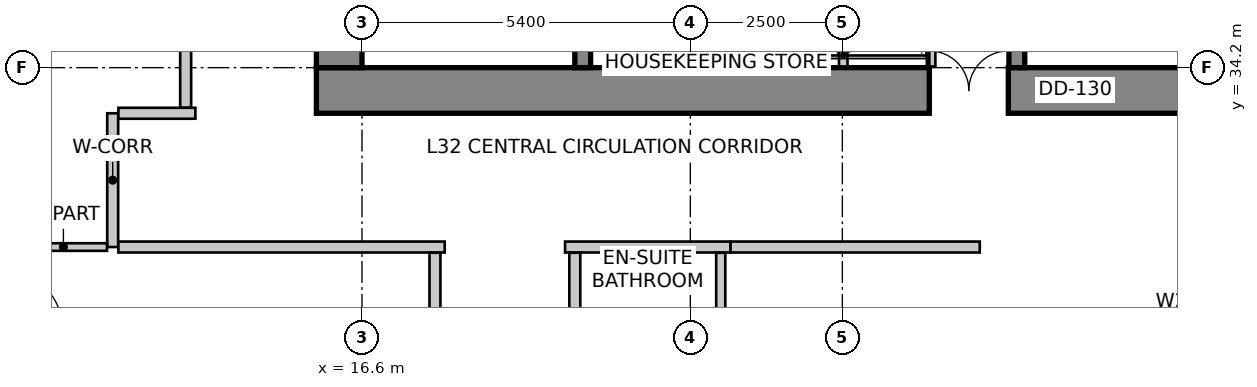
"""IFC4 building model, lengths in metres.
Left out: names, types, materials, properties, quantities, classifications, styles, units other than length and angle.
Written with IfcOpenShell. Run it as: python <this file> out.ifc"""

import sys

from ifc_helpers import new_model, si_unit, direction, frame, frame_2d, origin, place, context, subcontext, project, spatial, rectangle, extrude, source, transform, mapped, element, fill, save


model = new_model("IFC4")
c1 = context("Model", 3, precision=1e-05, world=origin(), true_north=direction((0.0, 1.0)))
c2 = subcontext(c1, "Body", "Model", "MODEL_VIEW")
j1 = project(units=[si_unit("LENGTHUNIT", "METRE"), si_unit("PLANEANGLEUNIT", "RADIAN")], contexts=[c1])
p1 = place(None, origin())
s1 = spatial("IfcSite", under=j1, at=p1, CompositionType="ELEMENT")
p2 = place(p1, origin())
s2 = spatial("IfcBuilding", under=s1, at=p2, CompositionType="ELEMENT")
p3 = place(p2, frame((0.0, 0.0, 132.2)))
s3 = spatial("IfcBuildingStorey", under=s2, at=p3, CompositionType="ELEMENT", Elevation=132.2)
p4 = place(p3, frame((15.85, 33.825, 0.0), z_axis=(0.0, 0.0, 1.0), x_axis=(1.0, 0.0, 0.0)))
e1 = element("IfcWall", 1, at=p4, inside=s3, PredefinedType="SHEAR", context=c2, shape_type="SweptSolid", body=[
    extrude(rectangle(XDim=15.9, YDim=0.75, at=frame_2d((7.95, 0.0))), origin(), (0.0, 0.0, 1.0), 3.6),
])
m1 = source(origin(), c2, "Body", "SweptSolid", [
    extrude(rectangle(XDim=1.3, YDim=2.15, at=frame_2d((0.65, 1.075))), frame((0.0, 0.385, 0.0), z_axis=(0.0, -1.0, 0.0), x_axis=(1.0, 0.0, 0.0)), (0.0, 0.0, 1.0), 0.77),
])
p5 = place(p4, frame((10.08, 0.0, 0.0)))
e2 = element("IfcOpeningElement", 2, at=p5, cuts=e1, PredefinedType="OPENING", context=c2, shape_type="MappedRepresentation", body=[
    mapped(m1, transform((0.0, 0.0, 0.0), scale=1.0)),
])
p6 = place(p3, frame((16.225, 34.2, 0.0), z_axis=(0.0, 0.0, 1.0), x_axis=(0.0, 1.0, 0.0)))
e3 = element("IfcWall", 3, at=p6, inside=s3, PredefinedType="SHEAR", context=c2, shape_type="SweptSolid", body=[
    extrude(rectangle(XDim=11.4, YDim=0.75, at=frame_2d((5.7, 0.0))), origin(), (0.0, 0.0, 1.0), 3.6),
])
m2 = source(origin(), c2, "Body", "SweptSolid", [
    extrude(rectangle(XDim=1.1, YDim=2.15, at=frame_2d((0.55, 1.075))), frame((0.0, 0.385, 0.0), z_axis=(0.0, -1.0, 0.0), x_axis=(1.0, 0.0, 0.0)), (0.0, 0.0, 1.0), 0.77),
])
p7 = place(p6, frame((7.15, 0.0, 0.0)))
e4 = element("IfcOpeningElement", 4, at=p7, cuts=e3, PredefinedType="OPENING", context=c2, shape_type="MappedRepresentation", body=[
    mapped(m2, transform((0.0, 0.0, 0.0), scale=1.0)),
])
p8 = place(p3, frame((20.23, 34.2, 0.0), z_axis=(0.0, 0.0, 1.0), x_axis=(0.0, 1.0, 0.0)))
e5 = element("IfcWall", 5, at=p8, inside=s3, PredefinedType="SHEAR", context=c2, shape_type="SweptSolid", body=[
    extrude(rectangle(XDim=9.06, YDim=0.26, at=frame_2d((4.53, 0.0))), origin(), (0.0, 0.0, 1.0), 3.6),
])
m3 = source(origin(), c2, "Body", "SweptSolid", [
    extrude(rectangle(XDim=1.1, YDim=2.15, at=frame_2d((0.55, 1.075))), frame((0.0, 0.14, 0.0), z_axis=(0.0, -1.0, 0.0), x_axis=(1.0, 0.0, 0.0)), (0.0, 0.0, 1.0), 0.28),
])
p9 = place(p8, frame((7.45, 0.0, 0.0)))
e6 = element("IfcOpeningElement", 6, at=p9, cuts=e5, PredefinedType="OPENING", context=c2, shape_type="MappedRepresentation", body=[
    mapped(m3, transform((0.0, 0.0, 0.0), scale=1.0)),
])
p10 = place(p3, frame((27.37, 34.2, 0.0), z_axis=(0.0, 0.0, 1.0), x_axis=(0.0, 1.0, 0.0)))
e7 = element("IfcWall", 7, at=p10, inside=s3, PredefinedType="SHEAR", context=c2, shape_type="SweptSolid", body=[
    extrude(rectangle(XDim=9.06, YDim=0.26, at=frame_2d((4.53, 0.0))), origin(), (0.0, 0.0, 1.0), 3.6),
])
p11 = place(p10, frame((7.45, 0.0, 0.0)))
e8 = element("IfcOpeningElement", 8, at=p11, cuts=e7, PredefinedType="OPENING", context=c2, shape_type="MappedRepresentation", body=[
    mapped(m3, transform((0.0, 0.0, 0.0), scale=1.0)),
])
p12 = place(p3, frame((28.884, 28.792, 0.0), z_axis=(0.0, 0.0, 1.0), x_axis=(0.707064797706, 0.707148762175, 0.0)))
e9 = element("IfcWall", 9, at=p12, inside=s3, PredefinedType="SOLIDWALL", context=c2, shape_type="SweptSolid", body=[
    extrude(rectangle(XDim=2.908, YDim=0.3, at=frame_2d((1.454, 0.0))), origin(), (0.0, 0.0, 1.0), 3.35),
])
m4 = source(origin(), c2, "Body", "SweptSolid", [
    extrude(rectangle(XDim=1.8, YDim=2.1, at=frame_2d((0.9, 1.05))), frame((0.0, 0.16, 0.0), z_axis=(0.0, -1.0, 0.0), x_axis=(1.0, 0.0, 0.0)), (0.0, 0.0, 1.0), 0.32),
])
p13 = place(p12, frame((0.554, 0.0, 0.85)))
e10 = element("IfcOpeningElement", 10, at=p13, cuts=e9, PredefinedType="OPENING", context=c2, shape_type="MappedRepresentation", body=[
    mapped(m4, transform((0.0, 0.0, 0.0), scale=1.0)),
])
p14 = place(p3, frame((13.269, 47.134, 0.0), z_axis=(0.0, 0.0, 1.0), x_axis=(-0.319929596295, -0.947441319246, 0.0)))
e11 = element("IfcWall", 11, at=p14, inside=s3, PredefinedType="SOLIDWALL", context=c2, shape_type="SweptSolid", body=[
    extrude(rectangle(XDim=16.134, YDim=0.3, at=frame_2d((8.067, 0.0))), origin(), (0.0, 0.0, 1.0), 3.35),
])
m5 = source(origin(), c2, "Body", "SweptSolid", [
    extrude(rectangle(XDim=2.4, YDim=2.2, at=frame_2d((1.2, 1.1))), frame((0.0, 0.16, 0.0), z_axis=(0.0, -1.0, 0.0), x_axis=(1.0, 0.0, 0.0)), (0.0, 0.0, 1.0), 0.32),
])
p15 = place(p14, frame((2.276, 0.0, 0.85)))
e12 = element("IfcOpeningElement", 12, at=p15, cuts=e11, PredefinedType="OPENING", context=c2, shape_type="MappedRepresentation", body=[
    mapped(m5, transform((0.0, 0.0, 0.0), scale=1.0)),
])
m6 = source(origin(), c2, "Body", "SweptSolid", [
    extrude(rectangle(XDim=2.1, YDim=2.0, at=frame_2d((1.05, 1.0))), frame((0.0, 0.16, 0.0), z_axis=(0.0, -1.0, 0.0), x_axis=(1.0, 0.0, 0.0)), (0.0, 0.0, 1.0), 0.32),
])
p16 = place(p14, frame((7.361, 0.0, 0.85)))
e13 = element("IfcOpeningElement", 13, at=p16, cuts=e11, PredefinedType="OPENING", context=c2, shape_type="MappedRepresentation", body=[
    mapped(m6, transform((0.0, 0.0, 0.0), scale=1.0)),
])
p17 = place(p14, frame((12.147, 0.0, 0.85)))
e14 = element("IfcOpeningElement", 14, at=p17, cuts=e11, PredefinedType="OPENING", context=c2, shape_type="MappedRepresentation", body=[
    mapped(m5, transform((0.0, 0.0, 0.0), scale=1.0)),
])
p18 = place(p3, frame((8.185, 31.834, 0.0), z_axis=(0.0, 0.0, 1.0), x_axis=(0.189707113148, -0.981840725994, 0.0)))
e15 = element("IfcWall", 15, at=p18, inside=s3, PredefinedType="SOLIDWALL", context=c2, shape_type="SweptSolid", body=[
    extrude(rectangle(XDim=21.221, YDim=0.3, at=frame_2d((10.611, 0.0))), origin(), (0.0, 0.0, 1.0), 3.35),
])
m7 = source(origin(), c2, "Body", "SweptSolid", [
    extrude(rectangle(XDim=1.2, YDim=1.6, at=frame_2d((0.6, 0.8))), frame((0.0, 0.16, 0.0), z_axis=(0.0, -1.0, 0.0), x_axis=(1.0, 0.0, 0.0)), (0.0, 0.0, 1.0), 0.32),
])
p19 = place(p18, frame((1.127, 0.0, 0.85)))
e16 = element("IfcOpeningElement", 16, at=p19, cuts=e15, PredefinedType="OPENING", context=c2, shape_type="MappedRepresentation", body=[
    mapped(m7, transform((0.0, 0.0, 0.0), scale=1.0)),
])
p20 = place(p18, frame((4.369, 0.0, 0.85)))
e17 = element("IfcOpeningElement", 17, at=p20, cuts=e15, PredefinedType="OPENING", context=c2, shape_type="MappedRepresentation", body=[
    mapped(m6, transform((0.0, 0.0, 0.0), scale=1.0)),
])
p21 = place(p18, frame((8.521, 0.0, 0.85)))
e18 = element("IfcOpeningElement", 18, at=p21, cuts=e15, PredefinedType="OPENING", context=c2, shape_type="MappedRepresentation", body=[
    mapped(m7, transform((0.0, 0.0, 0.0), scale=1.0)),
])
p22 = place(p18, frame((12.654, 0.0, 0.85)))
e19 = element("IfcOpeningElement", 19, at=p22, cuts=e15, PredefinedType="OPENING", context=c2, shape_type="MappedRepresentation", body=[
    mapped(m6, transform((0.0, 0.0, 0.0), scale=1.0)),
])
p23 = place(p18, frame((18.094, 0.0, 0.85)))
e20 = element("IfcOpeningElement", 20, at=p23, cuts=e15, PredefinedType="OPENING", context=c2, shape_type="MappedRepresentation", body=[
    mapped(m6, transform((0.0, 0.0, 0.0), scale=1.0)),
])
for number, where, z_axis, x_axis in (
    (21, (25.96, 34.22, 0.0), (0.0, 0.0, 1.0), (0.0, 1.0, 0.0)),
    (22, (23.07, 34.22, 0.0), (0.0, 0.0, 1.0), (0.0, 1.0, 0.0)),
    (23, (24.515, 34.22, 0.0), (0.0, 0.0, 1.0), (0.0, 1.0, 0.0)),
):
    element("IfcWall", number, at=place(p3, frame(where, z_axis=z_axis, x_axis=x_axis)), inside=s3, PredefinedType="SOLIDWALL", context=c2, shape_type="SweptSolid", body=[
        extrude(rectangle(XDim=1.62, YDim=0.14, at=frame_2d((0.81, 0.0))), origin(), (0.0, 0.0, 1.0), 2.642),
    ])
p24 = place(p3, frame((12.5, 31.25, 0.0), z_axis=(0.0, 0.0, 1.0), x_axis=(0.0, 1.0, 0.0)))
e24 = element("IfcWall", 24, at=p24, inside=s3, PredefinedType="PARTITIONING", context=c2, shape_type="SweptSolid", body=[
    extrude(rectangle(XDim=2.2, YDim=0.18, at=frame_2d((1.1, 0.0))), origin(), (0.0, 0.0, 1.0), 3.034),
])
p25 = place(p3, frame((12.594, 33.45, 0.0), z_axis=(0.0, 0.0, 1.0), x_axis=(1.0, 0.0, 0.0)))
e25 = element("IfcWall", 25, at=p25, inside=s3, PredefinedType="PARTITIONING", context=c2, shape_type="SweptSolid", body=[
    extrude(rectangle(XDim=1.266, YDim=0.18, at=frame_2d((0.633, 0.0))), origin(), (0.0, 0.0, 1.0), 3.35),
])
p26 = place(p3, frame((17.96, 31.25, 0.0), z_axis=(0.0, 0.0, 1.0), x_axis=(-1.0, 0.0, 0.0)))
e26 = element("IfcWall", 26, at=p26, inside=s3, PredefinedType="PARTITIONING", context=c2, shape_type="SweptSolid", body=[
    extrude(rectangle(XDim=5.366, YDim=0.18, at=frame_2d((2.683, 0.0))), origin(), (0.0, 0.0, 1.0), 3.034),
])
p27 = place(p3, frame((22.66, 31.25, 0.0), z_axis=(0.0, 0.0, 1.0), x_axis=(-1.0, 0.0, 0.0)))
e27 = element("IfcWall", 27, at=p27, inside=s3, PredefinedType="PARTITIONING", context=c2, shape_type="SweptSolid", body=[
    extrude(rectangle(XDim=2.72, YDim=0.18, at=frame_2d((1.36, 0.0))), origin(), (0.0, 0.0, 1.0), 3.034),
])
p28 = place(p3, frame((26.76, 31.25, 0.0), z_axis=(0.0, 0.0, 1.0), x_axis=(-1.0, 0.0, 0.0)))
e28 = element("IfcWall", 28, at=p28, inside=s3, PredefinedType="PARTITIONING", context=c2, shape_type="SweptSolid", body=[
    extrude(rectangle(XDim=4.098, YDim=0.18, at=frame_2d((2.049, 0.0))), origin(), (0.0, 0.0, 1.0), 3.35),
])
p29 = place(p3, frame((13.7, 33.544, 0.0), z_axis=(0.0, 0.0, 1.0), x_axis=(0.0, 1.0, 0.0)))
e29 = element("IfcWall", 29, at=p29, inside=s3, PredefinedType="PARTITIONING", context=c2, shape_type="SweptSolid", body=[
    extrude(rectangle(XDim=13.86, YDim=0.18, at=frame_2d((6.93, 0.0))), origin(), (0.0, 0.0, 1.0), 2.492),
])
m8 = source(origin(), c2, "Body", "SweptSolid", [
    extrude(rectangle(XDim=0.9, YDim=2.15, at=frame_2d((0.45, 1.075))), frame((0.0, 0.1, 0.0), z_axis=(0.0, -1.0, 0.0), x_axis=(1.0, 0.0, 0.0)), (0.0, 0.0, 1.0), 0.2),
])
p30 = place(p29, frame((4.253, 0.0, 0.0)))
e30 = element("IfcOpeningElement", 30, at=p30, cuts=e29, PredefinedType="OPENING", context=c2, shape_type="MappedRepresentation", body=[
    mapped(m8, transform((0.0, 0.0, 0.0), scale=1.0)),
])
p31 = place(p3, frame((12.406, 31.25, 0.0), z_axis=(0.0, 0.0, 1.0), x_axis=(-1.0, 0.0, 0.0)))
e31 = element("IfcWall", 31, at=p31, inside=s3, PredefinedType="PARTITIONING", context=c2, shape_type="SweptSolid", body=[
    extrude(rectangle(XDim=1.433, YDim=0.125, at=frame_2d((0.717, 0.0))), origin(), (0.0, 0.0, 1.0), 2.492),
])
p32 = place(p3, frame((17.8, 23.84, 0.0), z_axis=(0.0, 0.0, 1.0), x_axis=(0.0, 1.0, 0.0)))
e32 = element("IfcWall", 32, at=p32, inside=s3, PredefinedType="PARTITIONING", context=c2, shape_type="SweptSolid", body=[
    extrude(rectangle(XDim=7.316, YDim=0.18, at=frame_2d((3.658, 0.0))), origin(), (0.0, 0.0, 1.0), 2.803),
])
p33 = place(p32, frame((3.208, 0.0, 0.0)))
e33 = element("IfcOpeningElement", 33, at=p33, cuts=e32, PredefinedType="OPENING", context=c2, shape_type="MappedRepresentation", body=[
    mapped(m8, transform((0.0, 0.0, 0.0), scale=1.0)),
])
p34 = place(p3, frame((20.1, 31.156, 0.0), z_axis=(0.0, 0.0, 1.0), x_axis=(0.0, -1.0, 0.0)))
e34 = element("IfcWall", 34, at=p34, inside=s3, PredefinedType="PARTITIONING", context=c2, shape_type="SweptSolid", body=[
    extrude(rectangle(XDim=2.266, YDim=0.18, at=frame_2d((1.133, 0.0))), origin(), (0.0, 0.0, 1.0), 3.034),
])
p35 = place(p3, frame((22.5, 31.156, 0.0), z_axis=(0.0, 0.0, 1.0), x_axis=(0.0, -1.0, 0.0)))
e35 = element("IfcWall", 35, at=p35, inside=s3, PredefinedType="PARTITIONING", context=c2, shape_type="SweptSolid", body=[
    extrude(rectangle(XDim=2.027, YDim=0.15, at=frame_2d((1.014, 0.0))), origin(), (0.0, 0.0, 1.0), 3.034),
])
m9 = source(origin(), c2, "Body", "SweptSolid", [
    extrude(rectangle(XDim=1.8, YDim=2.1, at=frame_2d((0.9, 1.05))), frame((0.0, -0.015, 0.0), z_axis=(0.0, -1.0, 0.0), x_axis=(1.0, 0.0, 0.0)), (0.0, 0.0, 1.0), 0.06),
])
p36 = place(p13, origin())
e36 = element("IfcWindow", 36, at=p36, inside=s3, PartitioningType="SINGLE_PANEL", PredefinedType="WINDOW", context=c2, shape_type="MappedRepresentation", body=[
    mapped(m9, transform((0.0, 0.0, 0.0), scale=1.0)),
])
fill(e10, e36)
m10 = source(origin(), c2, "Body", "SweptSolid", [
    extrude(rectangle(XDim=1.3, YDim=2.15, at=frame_2d((0.65, 1.075))), frame((0.0, 0.025, 0.0), z_axis=(0.0, -1.0, 0.0), x_axis=(1.0, 0.0, 0.0)), (0.0, 0.0, 1.0), 0.05),
])
p37 = place(p5, origin())
e37 = element("IfcDoor", 37, at=p37, inside=s3, OperationType="DOUBLE_DOOR_SINGLE_SWING", PredefinedType="DOOR", context=c2, shape_type="MappedRepresentation", body=[
    mapped(m10, transform((0.0, 0.0, 0.0), scale=1.0)),
])
fill(e2, e37)
save(model, sys.argv[1])
